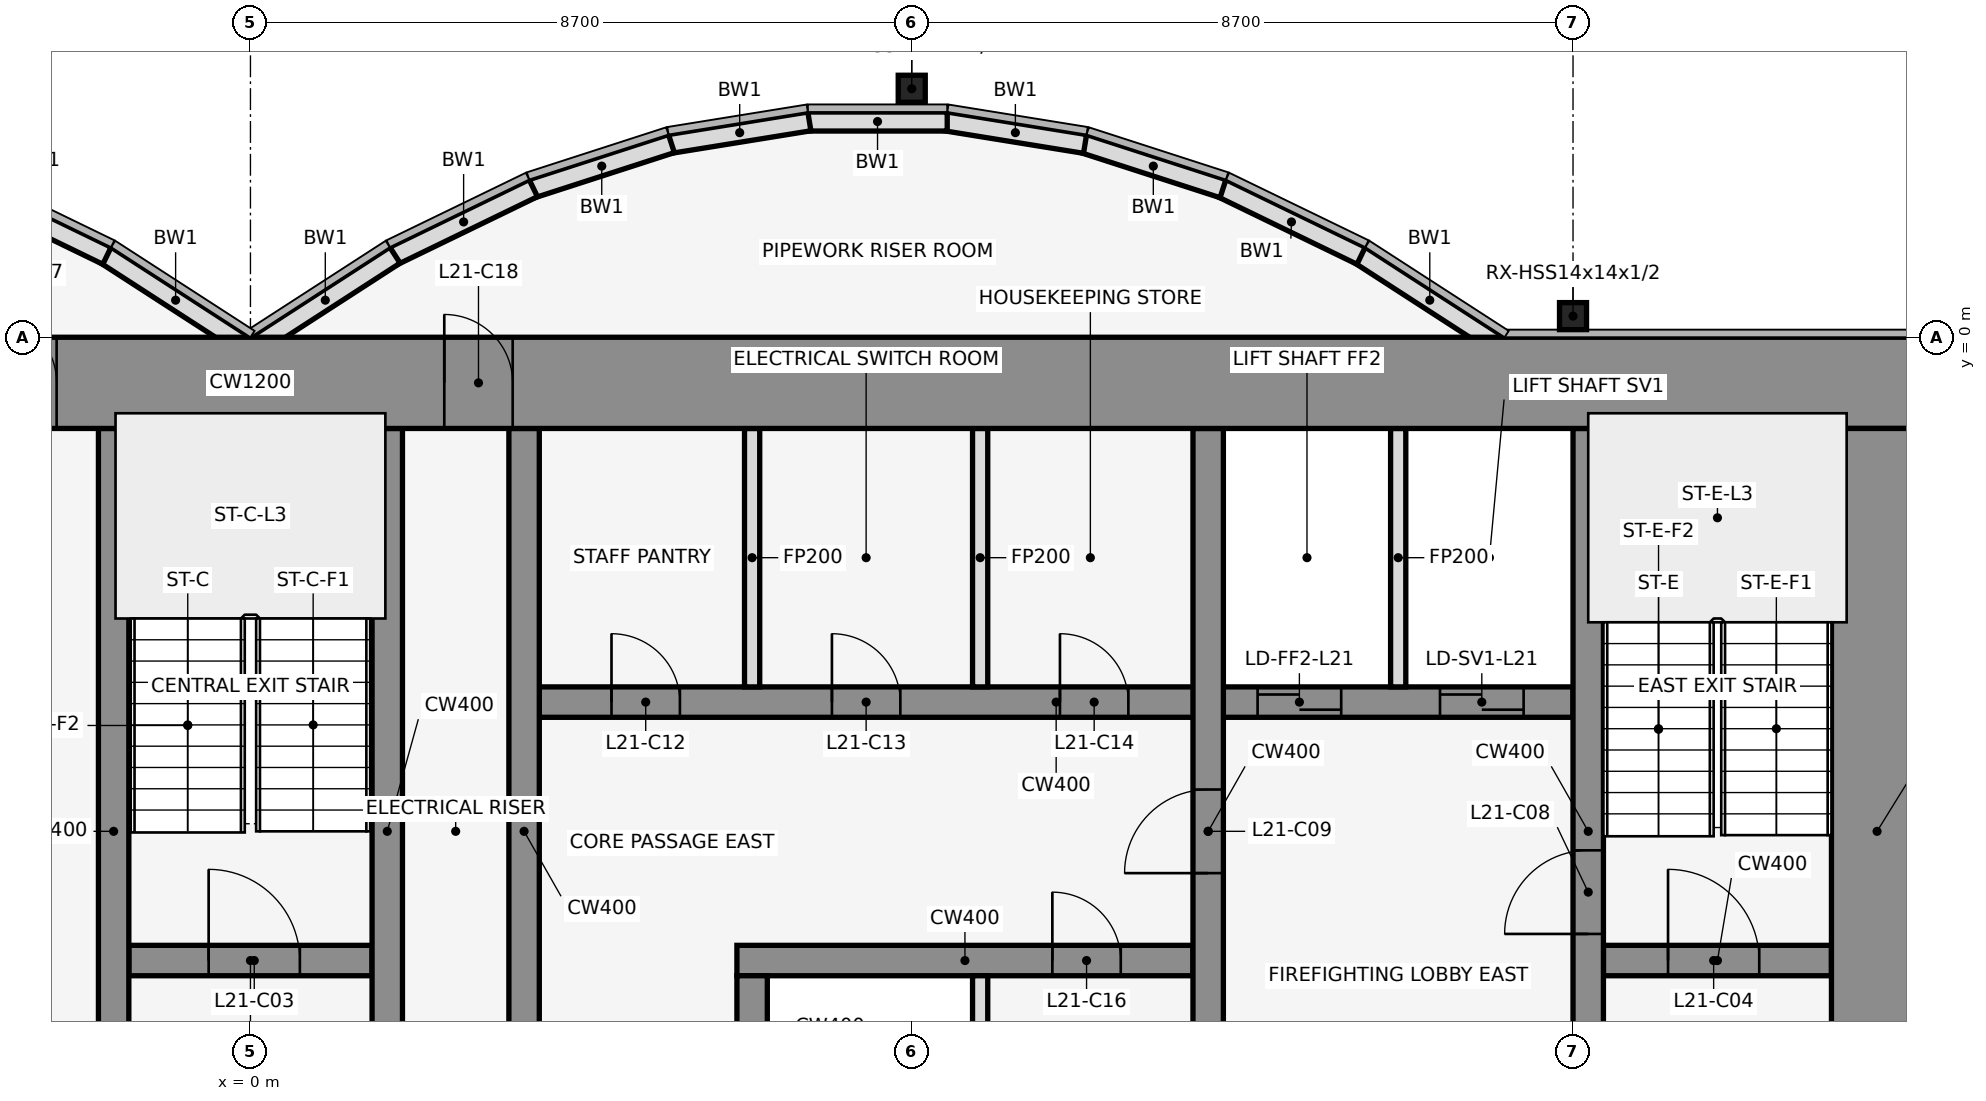
"""IFC4 building model, lengths in metres.
Left out: names, types, materials, properties, quantities, classifications, styles, units other than length and angle.
Written with IfcOpenShell. Run it as: python <this file> out.ifc"""

import sys

from ifc_helpers import new_model, si_unit, direction, frame, frame_2d, origin, origin_2d, place, context, subcontext, project, spatial, rectangle, hollow_rectangle, extrude, element, fill, save


model = new_model("IFC4")
c1 = context("Model", 3, precision=1e-05, world=origin(), true_north=direction((0.0, 1.0)))
c2 = subcontext(c1, "Body", "Model", "MODEL_VIEW")
j1 = project(units=[si_unit("LENGTHUNIT", "METRE"), si_unit("PLANEANGLEUNIT", "RADIAN")], contexts=[c1])
p1 = place(None, origin())
s1 = spatial("IfcSite", under=j1, at=p1, CompositionType="ELEMENT")
p2 = place(p1, origin())
s2 = spatial("IfcBuilding", under=s1, at=p2, CompositionType="ELEMENT")
p3 = place(p2, frame((0.0, 0.0, 102.2)))
s3 = spatial("IfcBuildingStorey", under=s2, at=p3, CompositionType="ELEMENT", Elevation=102.2)
for number, where, z_axis, x_axis in (
    (1, (8.7, 3.269, 0.0), (0.0, 0.0, 1.0), (1.0, 0.0, 0.0)),
    (2, (17.4, 0.278, 0.0), (0.0, 0.0, 1.0), (1.0, 0.0, 0.0)),
):
    element("IfcColumn", number, at=place(p3, frame(where, z_axis=z_axis, x_axis=x_axis)), inside=s3, PredefinedType="COLUMN", context=c2, shape_type="SweptSolid", body=[
        extrude(hollow_rectangle(XDim=0.356, YDim=0.356, WallThickness=0.012, at=origin_2d()), origin(), (0.0, 0.0, 1.0), 4.1),
    ])
p4 = place(p3, frame((16.432, -0.105, 0.0), z_axis=(0.0, 0.0, 1.0), x_axis=(-0.83981312244, 0.542875602121, 0.0)))
e3 = element("IfcWall", 3, at=p4, inside=s3, PredefinedType="STANDARD", context=c2, shape_type="SweptSolid", body=[
    extrude(rectangle(XDim=2.183, YDim=0.25, at=frame_2d((1.091, 0.0))), origin(), (0.0, 0.0, 1.0), 3.95),
])
p5 = place(p3, frame((14.612, 1.073, 0.0), z_axis=(0.0, 0.0, 1.0), x_axis=(-0.89982408427, 0.436252928206, 0.0)))
e4 = element("IfcWall", 4, at=p5, inside=s3, PredefinedType="STANDARD", context=c2, shape_type="SweptSolid", body=[
    extrude(rectangle(XDim=2.038, YDim=0.25, at=frame_2d((1.019, 0.0))), origin(), (0.0, 0.0, 1.0), 3.95),
])
p6 = place(p3, frame((12.795, 1.955, 0.0), z_axis=(0.0, 0.0, 1.0), x_axis=(-0.951495806175, 0.307661714928, 0.0)))
e5 = element("IfcWall", 5, at=p6, inside=s3, PredefinedType="STANDARD", context=c2, shape_type="SweptSolid", body=[
    extrude(rectangle(XDim=1.927, YDim=0.25, at=frame_2d((0.963, 0.0))), origin(), (0.0, 0.0, 1.0), 3.95),
])
p7 = place(p3, frame((10.98, 2.543, 0.0), z_axis=(0.0, 0.0, 1.0), x_axis=(-0.987181718931, 0.159600293885, 0.0)))
e6 = element("IfcWall", 6, at=p7, inside=s3, PredefinedType="STANDARD", context=c2, shape_type="SweptSolid", body=[
    extrude(rectangle(XDim=1.857, YDim=0.25, at=frame_2d((0.929, 0.0))), origin(), (0.0, 0.0, 1.0), 3.95),
])
p8 = place(p3, frame((9.167, 2.838, 0.0), z_axis=(0.0, 0.0, 1.0), x_axis=(-1.0, 0.0, 0.0)))
e7 = element("IfcWall", 7, at=p8, inside=s3, PredefinedType="STANDARD", context=c2, shape_type="SweptSolid", body=[
    extrude(rectangle(XDim=1.833, YDim=0.25, at=frame_2d((0.917, 0.0))), origin(), (0.0, 0.0, 1.0), 3.95),
])
p9 = place(p3, frame((7.353, 2.84, 0.0), z_axis=(0.0, 0.0, 1.0), x_axis=(-0.987181718931, -0.159600293885, 0.0)))
e8 = element("IfcWall", 8, at=p9, inside=s3, PredefinedType="STANDARD", context=c2, shape_type="SweptSolid", body=[
    extrude(rectangle(XDim=1.857, YDim=0.25, at=frame_2d((0.929, 0.0))), origin(), (0.0, 0.0, 1.0), 3.95),
])
p10 = place(p3, frame((5.538, 2.548, 0.0), z_axis=(0.0, 0.0, 1.0), x_axis=(-0.951495806175, -0.307661714928, 0.0)))
e9 = element("IfcWall", 9, at=p10, inside=s3, PredefinedType="STANDARD", context=c2, shape_type="SweptSolid", body=[
    extrude(rectangle(XDim=1.927, YDim=0.25, at=frame_2d((0.963, 0.0))), origin(), (0.0, 0.0, 1.0), 3.95),
])
p11 = place(p3, frame((3.721, 1.962, 0.0), z_axis=(0.0, 0.0, 1.0), x_axis=(-0.89982408427, -0.436252928206, 0.0)))
e10 = element("IfcWall", 10, at=p11, inside=s3, PredefinedType="STANDARD", context=c2, shape_type="SweptSolid", body=[
    extrude(rectangle(XDim=2.038, YDim=0.25, at=frame_2d((1.019, 0.0))), origin(), (0.0, 0.0, 1.0), 3.95),
])
for number, where, z_axis, x_axis in (
    (11, (1.901, 1.08, 0.0), (0.0, 0.0, 1.0), (-0.84, -0.543, 0.0)),
    (12, (-0.068, -0.105, 0.0), (0.0, 0.0, 1.0), (-0.84, 0.543, 0.0)),
):
    element("IfcWall", number, at=place(p3, frame(where, z_axis=z_axis, x_axis=x_axis)), inside=s3, PredefinedType="STANDARD", context=c2, shape_type="SweptSolid", body=[
        extrude(rectangle(XDim=2.183, YDim=0.25, at=frame_2d((1.091, 0.0))), origin(), (0.0, 0.0, 1.0), 3.95),
    ])
p12 = place(p3, frame((-1.888, 1.073, 0.0), z_axis=(0.0, 0.0, 1.0), x_axis=(-0.89982408427, 0.436252928206, 0.0)))
e13 = element("IfcWall", 13, at=p12, inside=s3, PredefinedType="STANDARD", context=c2, shape_type="SweptSolid", body=[
    extrude(rectangle(XDim=2.038, YDim=0.25, at=frame_2d((1.019, 0.0))), origin(), (0.0, 0.0, 1.0), 3.95),
])
p13 = place(p3, frame((-1.6, -8.2, 0.0), z_axis=(0.0, 0.0, 1.0), x_axis=(1.0, 0.0, 0.0)))
e14 = element("IfcWall", 14, at=p13, inside=s3, PredefinedType="SHEAR", context=c2, shape_type="SweptSolid", body=[
    extrude(rectangle(XDim=3.2, YDim=0.4, at=frame_2d((1.6, 0.0))), origin(), (0.0, 0.0, 1.0), 4.1),
])
p14 = place(p13, frame((1.05, 0.0, 0.0)))
e15 = element("IfcOpeningElement", 15, at=p14, cuts=e14, PredefinedType="OPENING", context=c2, shape_type="SweptSolid", body=[
    extrude(rectangle(XDim=1.2, YDim=2.1, at=frame_2d((0.6, 1.05))), frame((0.0, 0.212, 0.0), z_axis=(0.0, -1.0, 0.0), x_axis=(1.0, 0.0, 0.0)), (0.0, 0.0, 1.0), 0.424),
])
p15 = place(p3, frame((6.4, -8.2, 0.0), z_axis=(0.0, 0.0, 1.0), x_axis=(1.0, 0.0, 0.0)))
e16 = element("IfcWall", 16, at=p15, inside=s3, PredefinedType="SHEAR", context=c2, shape_type="SweptSolid", body=[
    extrude(rectangle(XDim=6.0, YDim=0.4, at=frame_2d((3.0, 0.0))), origin(), (0.0, 0.0, 1.0), 4.1),
])
p16 = place(p15, frame((4.15, 0.0, 0.0)))
e17 = element("IfcOpeningElement", 17, at=p16, cuts=e16, PredefinedType="OPENING", context=c2, shape_type="SweptSolid", body=[
    extrude(rectangle(XDim=0.9, YDim=2.1, at=frame_2d((0.45, 1.05))), frame((0.0, 0.212, 0.0), z_axis=(0.0, -1.0, 0.0), x_axis=(1.0, 0.0, 0.0)), (0.0, 0.0, 1.0), 0.424),
])
p17 = place(p3, frame((17.8, -8.2, 0.0), z_axis=(0.0, 0.0, 1.0), x_axis=(1.0, 0.0, 0.0)))
e18 = element("IfcWall", 18, at=p17, inside=s3, PredefinedType="SHEAR", context=c2, shape_type="SweptSolid", body=[
    extrude(rectangle(XDim=3.0, YDim=0.4, at=frame_2d((1.5, 0.0))), origin(), (0.0, 0.0, 1.0), 4.1),
])
p18 = place(p17, frame((0.85, 0.0, 0.0)))
e19 = element("IfcOpeningElement", 19, at=p18, cuts=e18, PredefinedType="OPENING", context=c2, shape_type="SweptSolid", body=[
    extrude(rectangle(XDim=1.2, YDim=2.1, at=frame_2d((0.6, 1.05))), frame((0.0, 0.212, 0.0), z_axis=(0.0, -1.0, 0.0), x_axis=(1.0, 0.0, 0.0)), (0.0, 0.0, 1.0), 0.424),
])
p19 = place(p3, frame((3.8, -4.8, 0.0), z_axis=(0.0, 0.0, 1.0), x_axis=(1.0, 0.0, 0.0)))
e20 = element("IfcWall", 20, at=p19, inside=s3, PredefinedType="SHEAR", context=c2, shape_type="SweptSolid", body=[
    extrude(rectangle(XDim=13.6, YDim=0.4, at=frame_2d((6.8, 0.0))), origin(), (0.0, 0.0, 1.0), 4.1),
])
p20 = place(p19, frame((9.45, 0.0, 0.0)))
e21 = element("IfcOpeningElement", 21, at=p20, cuts=e20, PredefinedType="OPENING", context=c2, shape_type="SweptSolid", body=[
    extrude(rectangle(XDim=1.1, YDim=2.1, at=frame_2d((0.55, 1.05))), frame((0.0, 0.212, 0.0), z_axis=(0.0, -1.0, 0.0), x_axis=(1.0, 0.0, 0.0)), (0.0, 0.0, 1.0), 0.424),
])
p21 = place(p19, frame((11.85, 0.0, 0.0)))
e22 = element("IfcOpeningElement", 22, at=p21, cuts=e20, PredefinedType="OPENING", context=c2, shape_type="SweptSolid", body=[
    extrude(rectangle(XDim=1.1, YDim=2.1, at=frame_2d((0.55, 1.05))), frame((0.0, 0.212, 0.0), z_axis=(0.0, -1.0, 0.0), x_axis=(1.0, 0.0, 0.0)), (0.0, 0.0, 1.0), 0.424),
])
p22 = place(p19, frame((0.95, 0.0, 0.0)))
e23 = element("IfcOpeningElement", 23, at=p22, cuts=e20, PredefinedType="OPENING", context=c2, shape_type="SweptSolid", body=[
    extrude(rectangle(XDim=0.9, YDim=2.1, at=frame_2d((0.45, 1.05))), frame((0.0, 0.212, 0.0), z_axis=(0.0, -1.0, 0.0), x_axis=(1.0, 0.0, 0.0)), (0.0, 0.0, 1.0), 0.424),
])
p23 = place(p19, frame((3.85, 0.0, 0.0)))
e24 = element("IfcOpeningElement", 24, at=p23, cuts=e20, PredefinedType="OPENING", context=c2, shape_type="SweptSolid", body=[
    extrude(rectangle(XDim=0.9, YDim=2.1, at=frame_2d((0.45, 1.05))), frame((0.0, 0.212, 0.0), z_axis=(0.0, -1.0, 0.0), x_axis=(1.0, 0.0, 0.0)), (0.0, 0.0, 1.0), 0.424),
])
p24 = place(p19, frame((6.85, 0.0, 0.0)))
e25 = element("IfcOpeningElement", 25, at=p24, cuts=e20, PredefinedType="OPENING", context=c2, shape_type="SweptSolid", body=[
    extrude(rectangle(XDim=0.9, YDim=2.1, at=frame_2d((0.45, 1.05))), frame((0.0, 0.212, 0.0), z_axis=(0.0, -1.0, 0.0), x_axis=(1.0, 0.0, 0.0)), (0.0, 0.0, 1.0), 0.424),
])
for number, where, z_axis, x_axis in (
    (26, (-1.8, -11.8, 0.0), (0.0, 0.0, 1.0), (0.0, 1.0, 0.0)),
    (27, (1.8, -11.8, 0.0), (0.0, 0.0, 1.0), (0.0, 1.0, 0.0)),
):
    element("IfcWall", number, at=place(p3, frame(where, z_axis=z_axis, x_axis=x_axis)), inside=s3, PredefinedType="SHEAR", context=c2, shape_type="SweptSolid", body=[
        extrude(rectangle(XDim=10.6, YDim=0.4, at=frame_2d((5.3, 0.0))), origin(), (0.0, 0.0, 1.0), 4.1),
    ])
p25 = place(p3, frame((3.6, -11.8, 0.0), z_axis=(0.0, 0.0, 1.0), x_axis=(0.0, 1.0, 0.0)))
e28 = element("IfcWall", 28, at=p25, inside=s3, PredefinedType="SHEAR", context=c2, shape_type="SweptSolid", body=[
    extrude(rectangle(XDim=10.6, YDim=0.4, at=frame_2d((5.3, 0.0))), origin(), (0.0, 0.0, 1.0), 4.1),
])
p26 = place(p25, frame((1.35, 0.0, 0.0)))
e29 = element("IfcOpeningElement", 29, at=p26, cuts=e28, PredefinedType="OPENING", context=c2, shape_type="SweptSolid", body=[
    extrude(rectangle(XDim=0.9, YDim=2.1, at=frame_2d((0.45, 1.05))), frame((0.0, 0.212, 0.0), z_axis=(0.0, -1.0, 0.0), x_axis=(1.0, 0.0, 0.0)), (0.0, 0.0, 1.0), 0.424),
])
p27 = place(p3, frame((6.6, -11.8, 0.0), z_axis=(0.0, 0.0, 1.0), x_axis=(0.0, 1.0, 0.0)))
e30 = element("IfcWall", 30, at=p27, inside=s3, PredefinedType="SHEAR", context=c2, shape_type="SweptSolid", body=[
    extrude(rectangle(XDim=3.4, YDim=0.4, at=frame_2d((1.7, 0.0))), origin(), (0.0, 0.0, 1.0), 4.1),
])
for number, where, z_axis, x_axis in (
    (31, (6.6, -4.6, 0.0), (0.0, 0.0, 1.0), (0.0, 1.0, 0.0)),
    (32, (9.6, -11.8, 0.0), (0.0, 0.0, 1.0), (0.0, 1.0, 0.0)),
    (33, (9.6, -4.6, 0.0), (0.0, 0.0, 1.0), (0.0, 1.0, 0.0)),
):
    element("IfcWall", number, at=place(p3, frame(where, z_axis=z_axis, x_axis=x_axis)), inside=s3, PredefinedType="PARTITIONING", context=c2, shape_type="SweptSolid", body=[
        extrude(rectangle(XDim=3.4, YDim=0.2, at=frame_2d((1.7, 0.0))), origin(), (0.0, 0.0, 1.0), 3.018),
    ])
p28 = place(p3, frame((12.6, -11.8, 0.0), z_axis=(0.0, 0.0, 1.0), x_axis=(0.0, 1.0, 0.0)))
e34 = element("IfcWall", 34, at=p28, inside=s3, PredefinedType="SHEAR", context=c2, shape_type="SweptSolid", body=[
    extrude(rectangle(XDim=10.6, YDim=0.4, at=frame_2d((5.3, 0.0))), origin(), (0.0, 0.0, 1.0), 4.1),
])
p29 = place(p28, frame((4.75, 0.0, 0.0)))
e35 = element("IfcOpeningElement", 35, at=p29, cuts=e34, PredefinedType="OPENING", context=c2, shape_type="SweptSolid", body=[
    extrude(rectangle(XDim=1.1, YDim=2.1, at=frame_2d((0.55, 1.05))), frame((0.0, 0.212, 0.0), z_axis=(0.0, -1.0, 0.0), x_axis=(1.0, 0.0, 0.0)), (0.0, 0.0, 1.0), 0.424),
])
p30 = place(p3, frame((15.1, -4.6, 0.0), z_axis=(0.0, 0.0, 1.0), x_axis=(0.0, 1.0, 0.0)))
e36 = element("IfcWall", 36, at=p30, inside=s3, PredefinedType="PARTITIONING", context=c2, shape_type="SweptSolid", body=[
    extrude(rectangle(XDim=3.4, YDim=0.2, at=frame_2d((1.7, 0.0))), origin(), (0.0, 0.0, 1.0), 3.018),
])
p31 = place(p3, frame((17.6, -11.8, 0.0), z_axis=(0.0, 0.0, 1.0), x_axis=(0.0, 1.0, 0.0)))
e37 = element("IfcWall", 37, at=p31, inside=s3, PredefinedType="SHEAR", context=c2, shape_type="SweptSolid", body=[
    extrude(rectangle(XDim=10.6, YDim=0.4, at=frame_2d((5.3, 0.0))), origin(), (0.0, 0.0, 1.0), 4.1),
])
p32 = place(p31, frame((1.25, 0.0, 0.0)))
e38 = element("IfcOpeningElement", 38, at=p32, cuts=e37, PredefinedType="OPENING", context=c2, shape_type="SweptSolid", body=[
    extrude(rectangle(XDim=1.1, YDim=2.1, at=frame_2d((0.55, 1.05))), frame((0.0, 0.212, 0.0), z_axis=(0.0, -1.0, 0.0), x_axis=(1.0, 0.0, 0.0)), (0.0, 0.0, 1.0), 0.424),
])
p33 = place(p31, frame((3.95, 0.0, 0.0)))
e39 = element("IfcOpeningElement", 39, at=p33, cuts=e37, PredefinedType="OPENING", context=c2, shape_type="SweptSolid", body=[
    extrude(rectangle(XDim=1.1, YDim=2.1, at=frame_2d((0.55, 1.05))), frame((0.0, 0.212, 0.0), z_axis=(0.0, -1.0, 0.0), x_axis=(1.0, 0.0, 0.0)), (0.0, 0.0, 1.0), 0.424),
])
p34 = place(p3, frame((-22.0, -0.6, 0.0), z_axis=(0.0, 0.0, 1.0), x_axis=(1.0, 0.0, 0.0)))
e40 = element("IfcWall", 40, at=p34, inside=s3, PredefinedType="SHEAR", context=c2, shape_type="SweptSolid", body=[
    extrude(rectangle(XDim=44.0, YDim=1.2, at=frame_2d((22.0, 0.0))), origin(), (0.0, 0.0, 1.0), 4.1),
])
p35 = place(p34, frame((18.55, 0.0, 0.0)))
e41 = element("IfcOpeningElement", 41, at=p35, cuts=e40, PredefinedType="OPENING", context=c2, shape_type="SweptSolid", body=[
    extrude(rectangle(XDim=0.9, YDim=2.1, at=frame_2d((0.45, 1.05))), frame((0.0, 0.612, 0.0), z_axis=(0.0, -1.0, 0.0), x_axis=(1.0, 0.0, 0.0)), (0.0, 0.0, 1.0), 1.224),
])
p36 = place(p34, frame((24.55, 0.0, 0.0)))
e42 = element("IfcOpeningElement", 42, at=p36, cuts=e40, PredefinedType="OPENING", context=c2, shape_type="SweptSolid", body=[
    extrude(rectangle(XDim=0.9, YDim=2.1, at=frame_2d((0.45, 1.05))), frame((0.0, 0.612, 0.0), z_axis=(0.0, -1.0, 0.0), x_axis=(1.0, 0.0, 0.0)), (0.0, 0.0, 1.0), 1.224),
])
p37 = place(p3, frame((21.4, -11.8, 0.0), z_axis=(0.0, 0.0, 1.0), x_axis=(0.0, 1.0, 0.0)))
e43 = element("IfcWall", 43, at=p37, inside=s3, PredefinedType="SHEAR", context=c2, shape_type="SweptSolid", body=[
    extrude(rectangle(XDim=10.6, YDim=1.2, at=frame_2d((5.3, 0.0))), origin(), (0.0, 0.0, 1.0), 4.1),
])
p38 = place(p14, origin())
e44 = element("IfcDoor", 44, at=p38, inside=s3, OperationType="SINGLE_SWING_LEFT", PredefinedType="DOOR", context=c2, shape_type="SweptSolid", body=[
    extrude(rectangle(XDim=1.2, YDim=2.1, at=frame_2d((0.6, 1.05))), frame((0.0, 0.025, 0.0), z_axis=(0.0, -1.0, 0.0), x_axis=(1.0, 0.0, 0.0)), (0.0, 0.0, 1.0), 0.05),
])
fill(e15, e44)
p39 = place(p18, origin())
e45 = element("IfcDoor", 45, at=p39, inside=s3, OperationType="SINGLE_SWING_RIGHT", PredefinedType="DOOR", context=c2, shape_type="SweptSolid", body=[
    extrude(rectangle(XDim=1.2, YDim=2.1, at=frame_2d((0.6, 1.05))), frame((0.0, 0.025, 0.0), z_axis=(0.0, -1.0, 0.0), x_axis=(1.0, 0.0, 0.0)), (0.0, 0.0, 1.0), 0.05),
])
fill(e19, e45)
p40 = place(p20, origin())
e46 = element("IfcDoor", 46, at=p40, inside=s3, OperationType="DOUBLE_DOOR_SLIDING", PredefinedType="DOOR", context=c2, shape_type="SweptSolid", body=[
    extrude(rectangle(XDim=1.1, YDim=2.1, at=frame_2d((0.55, 1.05))), frame((0.0, 0.025, 0.0), z_axis=(0.0, -1.0, 0.0), x_axis=(1.0, 0.0, 0.0)), (0.0, 0.0, 1.0), 0.05),
])
fill(e21, e46)
p41 = place(p21, origin())
e47 = element("IfcDoor", 47, at=p41, inside=s3, OperationType="DOUBLE_DOOR_SLIDING", PredefinedType="DOOR", context=c2, shape_type="SweptSolid", body=[
    extrude(rectangle(XDim=1.1, YDim=2.1, at=frame_2d((0.55, 1.05))), frame((0.0, 0.025, 0.0), z_axis=(0.0, -1.0, 0.0), x_axis=(1.0, 0.0, 0.0)), (0.0, 0.0, 1.0), 0.05),
])
fill(e22, e47)
p42 = place(p33, origin())
e48 = element("IfcDoor", 48, at=p42, inside=s3, OperationType="SINGLE_SWING_RIGHT", PredefinedType="DOOR", context=c2, shape_type="SweptSolid", body=[
    extrude(rectangle(XDim=1.1, YDim=2.1, at=frame_2d((0.55, 1.05))), frame((0.0, 0.025, 0.0), z_axis=(0.0, -1.0, 0.0), x_axis=(1.0, 0.0, 0.0)), (0.0, 0.0, 1.0), 0.05),
])
fill(e39, e48)
p43 = place(p29, frame((1.1, 0.0, 0.0), z_axis=(0.0, 0.0, 1.0), x_axis=(-1.0, 0.0, 0.0)))
e49 = element("IfcDoor", 49, at=p43, inside=s3, OperationType="SINGLE_SWING_RIGHT", PredefinedType="DOOR", context=c2, shape_type="SweptSolid", body=[
    extrude(rectangle(XDim=1.1, YDim=2.1, at=frame_2d((0.55, 1.05))), frame((0.0, 0.025, 0.0), z_axis=(0.0, -1.0, 0.0), x_axis=(1.0, 0.0, 0.0)), (0.0, 0.0, 1.0), 0.05),
])
fill(e35, e49)
p44 = place(p22, origin())
e50 = element("IfcDoor", 50, at=p44, inside=s3, OperationType="SINGLE_SWING_RIGHT", PredefinedType="DOOR", context=c2, shape_type="SweptSolid", body=[
    extrude(rectangle(XDim=0.9, YDim=2.1, at=frame_2d((0.45, 1.05))), frame((0.0, 0.025, 0.0), z_axis=(0.0, -1.0, 0.0), x_axis=(1.0, 0.0, 0.0)), (0.0, 0.0, 1.0), 0.05),
])
fill(e23, e50)
p45 = place(p23, origin())
e51 = element("IfcDoor", 51, at=p45, inside=s3, OperationType="SINGLE_SWING_LEFT", PredefinedType="DOOR", context=c2, shape_type="SweptSolid", body=[
    extrude(rectangle(XDim=0.9, YDim=2.1, at=frame_2d((0.45, 1.05))), frame((0.0, 0.025, 0.0), z_axis=(0.0, -1.0, 0.0), x_axis=(1.0, 0.0, 0.0)), (0.0, 0.0, 1.0), 0.05),
])
fill(e24, e51)
p46 = place(p24, origin())
e52 = element("IfcDoor", 52, at=p46, inside=s3, OperationType="SINGLE_SWING_RIGHT", PredefinedType="DOOR", context=c2, shape_type="SweptSolid", body=[
    extrude(rectangle(XDim=0.9, YDim=2.1, at=frame_2d((0.45, 1.05))), frame((0.0, 0.025, 0.0), z_axis=(0.0, -1.0, 0.0), x_axis=(1.0, 0.0, 0.0)), (0.0, 0.0, 1.0), 0.05),
])
fill(e25, e52)
p47 = place(p16, frame((0.9, 0.0, 0.0), z_axis=(0.0, 0.0, 1.0), x_axis=(-1.0, 0.0, 0.0)))
e53 = element("IfcDoor", 53, at=p47, inside=s3, OperationType="SINGLE_SWING_LEFT", PredefinedType="DOOR", context=c2, shape_type="SweptSolid", body=[
    extrude(rectangle(XDim=0.9, YDim=2.1, at=frame_2d((0.45, 1.05))), frame((0.0, 0.025, 0.0), z_axis=(0.0, -1.0, 0.0), x_axis=(1.0, 0.0, 0.0)), (0.0, 0.0, 1.0), 0.05),
])
fill(e17, e53)
p48 = place(p35, origin())
e54 = element("IfcDoor", 54, at=p48, inside=s3, OperationType="SINGLE_SWING_LEFT", PredefinedType="DOOR", context=c2, shape_type="SweptSolid", body=[
    extrude(rectangle(XDim=0.9, YDim=2.1, at=frame_2d((0.45, 1.05))), frame((0.0, 0.025, 0.0), z_axis=(0.0, -1.0, 0.0), x_axis=(1.0, 0.0, 0.0)), (0.0, 0.0, 1.0), 0.05),
])
fill(e41, e54)
p49 = place(p36, origin())
e55 = element("IfcDoor", 55, at=p49, inside=s3, OperationType="SINGLE_SWING_LEFT", PredefinedType="DOOR", context=c2, shape_type="SweptSolid", body=[
    extrude(rectangle(XDim=0.9, YDim=2.1, at=frame_2d((0.45, 1.05))), frame((0.0, 0.025, 0.0), z_axis=(0.0, -1.0, 0.0), x_axis=(1.0, 0.0, 0.0)), (0.0, 0.0, 1.0), 0.05),
])
fill(e42, e55)
save(model, sys.argv[1])
